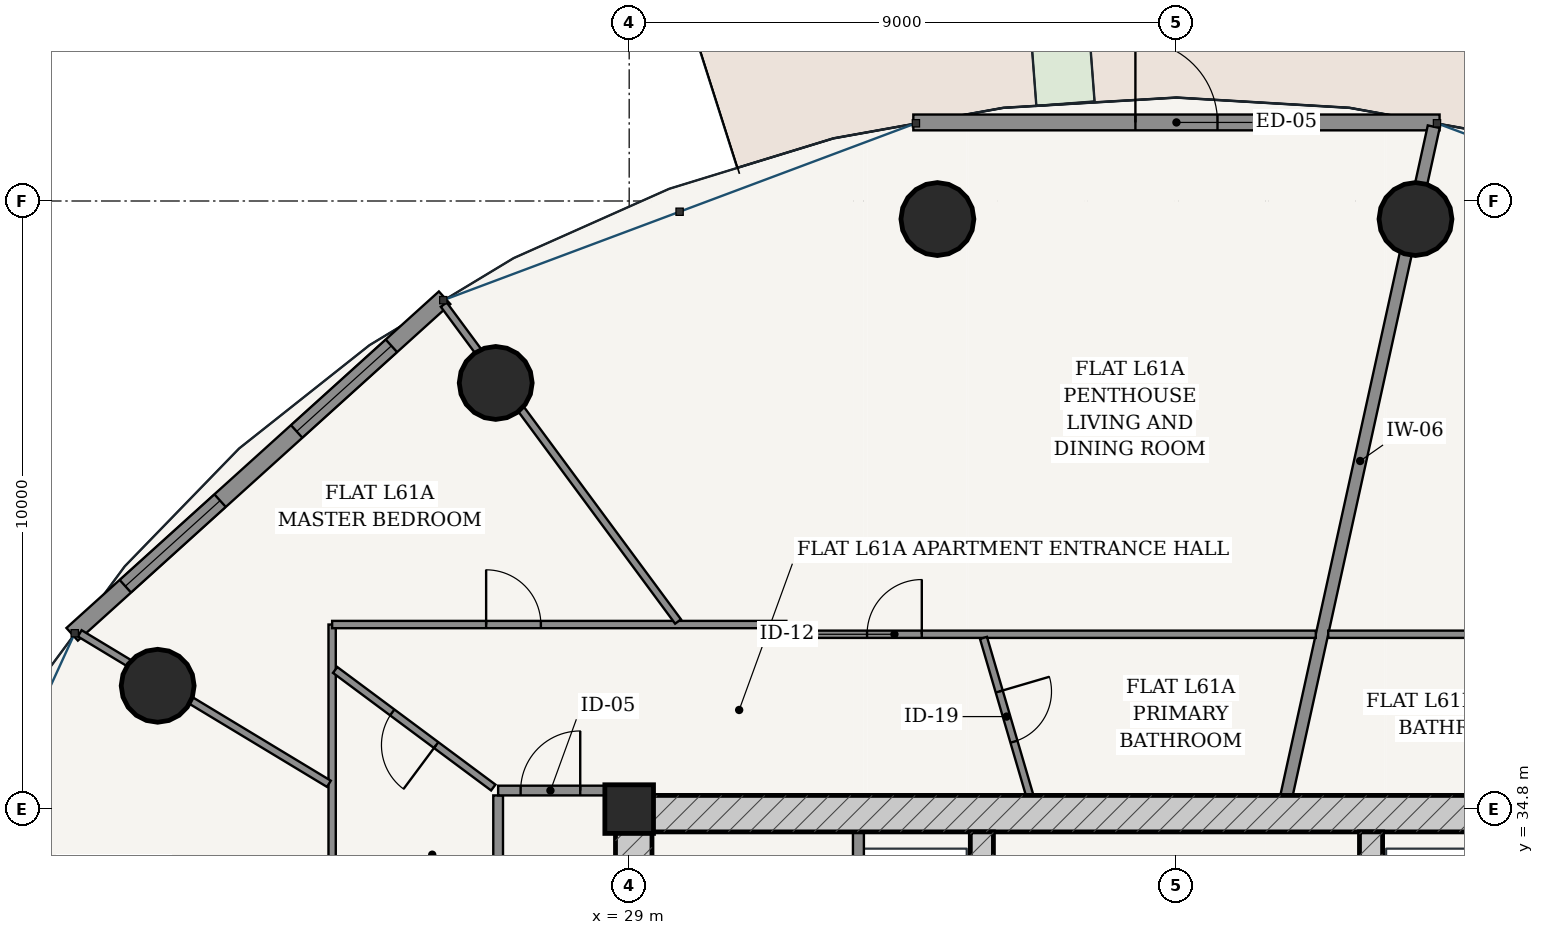
"""IFC4 building model, lengths in metres.
Left out: names, types, materials, properties, quantities, classifications, styles, units other than length and angle.
Written with IfcOpenShell. Run it as: python <this file> out.ifc"""

import sys

from ifc_helpers import new_model, si_unit, direction, frame, frame_2d, origin, origin_2d, place, context, subcontext, project, spatial, rectangle, hollow_circle, extrude, source, transform, mapped, element, fill, save


model = new_model("IFC4")
c1 = context("Model", 3, precision=1e-05, world=origin(), true_north=direction((-0.2419218956, 0.970295726276)))
c2 = subcontext(c1, "Body", "Model", "MODEL_VIEW")
j1 = project(units=[si_unit("LENGTHUNIT", "METRE"), si_unit("PLANEANGLEUNIT", "RADIAN")], contexts=[c1])
p1 = place(None, origin())
s1 = spatial("IfcSite", under=j1, at=p1, CompositionType="ELEMENT")
p2 = place(p1, origin())
s2 = spatial("IfcBuilding", under=s1, at=p2, CompositionType="ELEMENT")
p3 = place(p2, frame((0.0, 0.0, 231.9)))
s3 = spatial("IfcBuildingStorey", under=s2, at=p3, CompositionType="ELEMENT", Elevation=231.9)
p4 = place(p3, frame((29.0, 34.8, 0.0), z_axis=(0.0, 0.0, 1.0), x_axis=(1.0, 0.0, 0.0)))
e1 = element("IfcColumn", 1, at=p4, inside=s3, PredefinedType="COLUMN", context=c2, shape_type="SweptSolid", body=[
    extrude(rectangle(XDim=0.8, YDim=0.8, at=origin_2d()), origin(), (0.0, 0.0, 1.0), 3.7),
])
p5 = place(p3, frame((28.775, 34.725, 0.0), z_axis=(0.0, 0.0, 1.0), x_axis=(1.0, 0.0, 0.0)))
e2 = element("IfcWall", 2, at=p5, inside=s3, PredefinedType="SHEAR", context=c2, shape_type="SweptSolid", body=[
    extrude(rectangle(XDim=18.45, YDim=0.6, at=frame_2d((9.225, 0.0))), origin(), (0.0, 0.0, 1.0), 3.435),
])
p6 = place(p3, frame((29.075, 19.175, 0.0), z_axis=(0.0, 0.0, 1.0), x_axis=(0.0, 1.0, 0.0)))
e3 = element("IfcWall", 3, at=p6, inside=s3, PredefinedType="SHEAR", context=c2, shape_type="SweptSolid", body=[
    extrude(rectangle(XDim=15.25, YDim=0.6, at=frame_2d((7.625, 0.0))), origin(), (0.0, 0.0, 1.0), 3.435),
])
p7 = place(p6, frame((9.875, 0.0, 0.0)))
e4 = element("IfcOpeningElement", 4, at=p7, cuts=e3, PredefinedType="OPENING", context=c2, shape_type="SweptSolid", body=[
    extrude(rectangle(XDim=1.5, YDim=2.2, at=frame_2d((0.75, 1.1))), frame((0.0, 0.31, 0.0), z_axis=(0.0, -1.0, 0.0), x_axis=(1.0, 0.0, 0.0)), (0.0, 0.0, 1.0), 0.62),
])
p8 = place(p3, frame((34.8, 19.175, 0.0), z_axis=(0.0, 0.0, 1.0), x_axis=(0.0, 1.0, 0.0)))
e5 = element("IfcWall", 5, at=p8, inside=s3, PredefinedType="SHEAR", context=c2, shape_type="SweptSolid", body=[
    extrude(rectangle(XDim=15.25, YDim=0.38, at=frame_2d((7.625, 0.0))), origin(), (0.0, 0.0, 1.0), 3.435),
])
p9 = place(p8, frame((7.8, 0.0, 0.0)))
e6 = element("IfcOpeningElement", 6, at=p9, cuts=e5, PredefinedType="OPENING", context=c2, shape_type="SweptSolid", body=[
    extrude(rectangle(XDim=1.05, YDim=2.15, at=frame_2d((0.525, 1.075))), frame((0.0, 0.2, 0.0), z_axis=(0.0, -1.0, 0.0), x_axis=(1.0, 0.0, 0.0)), (0.0, 0.0, 1.0), 0.4),
])
p10 = place(p3, frame((41.2, 19.175, 0.0), z_axis=(0.0, 0.0, 1.0), x_axis=(0.0, 1.0, 0.0)))
e7 = element("IfcWall", 7, at=p10, inside=s3, PredefinedType="SHEAR", context=c2, shape_type="SweptSolid", body=[
    extrude(rectangle(XDim=15.25, YDim=0.38, at=frame_2d((7.625, 0.0))), origin(), (0.0, 0.0, 1.0), 3.435),
])
p11 = place(p10, frame((7.8, 0.0, 0.0)))
e8 = element("IfcOpeningElement", 8, at=p11, cuts=e7, PredefinedType="OPENING", context=c2, shape_type="SweptSolid", body=[
    extrude(rectangle(XDim=1.05, YDim=2.15, at=frame_2d((0.525, 1.075))), frame((0.0, 0.2, 0.0), z_axis=(0.0, -1.0, 0.0), x_axis=(1.0, 0.0, 0.0)), (0.0, 0.0, 1.0), 0.4),
])
for number, where, z_axis, x_axis in (
    (9, (41.931, 44.503, 0.0), (0.0, 0.0, 1.0), (1.0, 0.0, 0.0)),
    (10, (34.069, 44.503, 0.0), (0.0, 0.0, 1.0), (1.0, 0.0, 0.0)),
    (11, (26.805, 41.808, 0.0), (0.0, 0.0, 1.0), (1.0, 0.0, 0.0)),
    (12, (21.246, 36.828, 0.0), (0.0, 0.0, 1.0), (1.0, 0.0, 0.0)),
):
    element("IfcColumn", number, at=place(p3, frame(where, z_axis=z_axis, x_axis=x_axis)), inside=s3, PredefinedType="COLUMN", context=c2, shape_type="SweptSolid", body=[
        extrude(hollow_circle(Radius=0.6, WallThickness=0.038, at=origin_2d()), origin(), (0.0, 0.0, 1.0), 3.7),
    ])
p12 = place(p3, frame((42.327, 46.092, 0.0), z_axis=(0.0, 0.0, 1.0), x_axis=(-1.0, 0.0, 0.0)))
e13 = element("IfcWall", 13, at=p12, inside=s3, PredefinedType="SOLIDWALL", context=c2, shape_type="SweptSolid", body=[
    extrude(rectangle(XDim=8.654, YDim=0.26, at=frame_2d((4.327, 0.0))), origin(), (0.0, 0.0, 1.0), 3.435),
])
p13 = place(p12, frame((3.652, 0.0, 0.0)))
e14 = element("IfcOpeningElement", 14, at=p13, cuts=e13, PredefinedType="OPENING", context=c2, shape_type="SweptSolid", body=[
    extrude(rectangle(XDim=1.35, YDim=2.2, at=frame_2d((0.675, 1.1))), frame((0.0, 0.14, 0.0), z_axis=(0.0, -1.0, 0.0), x_axis=(1.0, 0.0, 0.0)), (0.0, 0.0, 1.0), 0.28),
])
p14 = place(p3, frame((25.965, 43.209, 0.0), z_axis=(0.0, 0.0, 1.0), x_axis=(-0.741972126783, -0.670430729514, 0.0)))
e15 = element("IfcWall", 15, at=p14, inside=s3, PredefinedType="SOLIDWALL", context=c2, shape_type="SweptSolid", body=[
    extrude(rectangle(XDim=8.255, YDim=0.28, at=frame_2d((4.127, 0.0))), origin(), (0.0, 0.0, 1.0), 3.435),
])
p15 = place(p14, frame((1.179, 0.0, 0.85)))
e16 = element("IfcOpeningElement", 16, at=p15, cuts=e15, PredefinedType="OPENING", context=c2, shape_type="SweptSolid", body=[
    extrude(rectangle(XDim=2.1, YDim=1.95, at=frame_2d((1.05, 0.975))), frame((0.0, 0.15, 0.0), z_axis=(0.0, -1.0, 0.0), x_axis=(1.0, 0.0, 0.0)), (0.0, 0.0, 1.0), 0.3),
])
p16 = place(p14, frame((4.976, 0.0, 0.85)))
e17 = element("IfcOpeningElement", 17, at=p16, cuts=e15, PredefinedType="OPENING", context=c2, shape_type="SweptSolid", body=[
    extrude(rectangle(XDim=2.1, YDim=1.95, at=frame_2d((1.05, 0.975))), frame((0.0, 0.15, 0.0), z_axis=(0.0, -1.0, 0.0), x_axis=(1.0, 0.0, 0.0)), (0.0, 0.0, 1.0), 0.3),
])
p17 = place(p3, frame((32.77, 28.52, 0.0), z_axis=(0.0, 0.0, 1.0), x_axis=(0.0, 1.0, 0.0)))
e18 = element("IfcWall", 18, at=p17, inside=s3, PredefinedType="PARTITIONING", context=c2, shape_type="SweptSolid", body=[
    extrude(rectangle(XDim=5.905, YDim=0.18, at=frame_2d((2.953, 0.0))), origin(), (0.0, 0.0, 1.0), 3.435),
])
p18 = place(p17, frame((3.655, 0.0, 0.0)))
e19 = element("IfcOpeningElement", 19, at=p18, cuts=e18, PredefinedType="OPENING", context=c2, shape_type="SweptSolid", body=[
    extrude(rectangle(XDim=1.15, YDim=2.2, at=frame_2d((0.575, 1.1))), frame((0.0, 0.1, 0.0), z_axis=(0.0, -1.0, 0.0), x_axis=(1.0, 0.0, 0.0)), (0.0, 0.0, 1.0), 0.2),
])
p19 = place(p17, frame((0.73, 0.0, 0.0)))
e20 = element("IfcOpeningElement", 20, at=p19, cuts=e18, PredefinedType="OPENING", context=c2, shape_type="SweptSolid", body=[
    extrude(rectangle(XDim=1.2, YDim=2.25, at=frame_2d((0.6, 1.125))), frame((0.0, 0.1, 0.0), z_axis=(0.0, -1.0, 0.0), x_axis=(1.0, 0.0, 0.0)), (0.0, 0.0, 1.0), 0.2),
])
p20 = place(p3, frame((26.845, 24.4, 0.0), z_axis=(0.0, 0.0, 1.0), x_axis=(0.0, 1.0, 0.0)))
e21 = element("IfcWall", 21, at=p20, inside=s3, PredefinedType="PARTITIONING", context=c2, shape_type="SweptSolid", body=[
    extrude(rectangle(XDim=10.625, YDim=0.16, at=frame_2d((5.312, 0.0))), origin(), (0.0, 0.0, 1.0), 2.951),
])
p21 = place(p3, frame((26.845, 35.105, 0.0), z_axis=(0.0, 0.0, 1.0), x_axis=(1.0, 0.0, 0.0)))
e22 = element("IfcWall", 22, at=p21, inside=s3, PredefinedType="PARTITIONING", context=c2, shape_type="SweptSolid", body=[
    extrude(rectangle(XDim=1.93, YDim=0.16, at=frame_2d((0.965, 0.0))), origin(), (0.0, 0.0, 1.0), 3.435),
])
p22 = place(p21, frame((0.37, 0.0, 0.0)))
e23 = element("IfcOpeningElement", 23, at=p22, cuts=e22, PredefinedType="OPENING", context=c2, shape_type="SweptSolid", body=[
    extrude(rectangle(XDim=0.98, YDim=2.2, at=frame_2d((0.49, 1.1))), frame((0.0, 0.09, 0.0), z_axis=(0.0, -1.0, 0.0), x_axis=(1.0, 0.0, 0.0)), (0.0, 0.0, 1.0), 0.18),
])
p23 = place(p3, frame((39.811, 35.027, 0.0), z_axis=(0.0, 0.0, 1.0), x_axis=(0.214966857327, 0.976621344356, 0.0)))
e24 = element("IfcWall", 24, at=p23, inside=s3, PredefinedType="PARTITIONING", context=c2, shape_type="SweptSolid", body=[
    extrude(rectangle(XDim=11.258, YDim=0.2, at=frame_2d((5.629, 0.0))), origin(), (0.0, 0.0, 1.0), 2.52),
])
p24 = place(p3, frame((24.115, 21.59, 0.0), z_axis=(0.0, 0.0, 1.0), x_axis=(0.0, 1.0, 0.0)))
e25 = element("IfcWall", 25, at=p24, inside=s3, PredefinedType="PARTITIONING", context=c2, shape_type="SweptSolid", body=[
    extrude(rectangle(XDim=16.245, YDim=0.12, at=frame_2d((8.123, 0.0))), origin(), (0.0, 0.0, 1.0), 2.951),
])
p25 = place(p24, frame((10.733, 0.0, 0.0)))
e26 = element("IfcOpeningElement", 26, at=p25, cuts=e25, PredefinedType="OPENING", context=c2, shape_type="SweptSolid", body=[
    extrude(rectangle(XDim=0.9, YDim=2.15, at=frame_2d((0.45, 1.075))), frame((0.0, 0.07, 0.0), z_axis=(0.0, -1.0, 0.0), x_axis=(1.0, 0.0, 0.0)), (0.0, 0.0, 1.0), 0.14),
])
p26 = place(p3, frame((24.115, 37.835, 0.0), z_axis=(0.0, 0.0, 1.0), x_axis=(1.0, 0.0, 0.0)))
e27 = element("IfcWall", 27, at=p26, inside=s3, PredefinedType="PARTITIONING", context=c2, shape_type="SweptSolid", body=[
    extrude(rectangle(XDim=7.47, YDim=0.12, at=frame_2d((3.735, 0.0))), origin(), (0.0, 0.0, 1.0), 2.951),
])
p27 = place(p26, frame((2.533, 0.0, 0.0)))
e28 = element("IfcOpeningElement", 28, at=p27, cuts=e27, PredefinedType="OPENING", context=c2, shape_type="SweptSolid", body=[
    extrude(rectangle(XDim=0.9, YDim=2.15, at=frame_2d((0.45, 1.075))), frame((0.0, 0.07, 0.0), z_axis=(0.0, -1.0, 0.0), x_axis=(1.0, 0.0, 0.0)), (0.0, 0.0, 1.0), 0.14),
])
p28 = place(p3, frame((31.585, 37.675, 0.0), z_axis=(0.0, 0.0, 1.0), x_axis=(1.0, 0.0, 0.0)))
e29 = element("IfcWall", 29, at=p28, inside=s3, PredefinedType="PARTITIONING", context=c2, shape_type="SweptSolid", body=[
    extrude(rectangle(XDim=8.707, YDim=0.12, at=frame_2d((4.354, 0.0))), origin(), (0.0, 0.0, 1.0), 2.951),
])
p29 = place(p28, frame((1.327, 0.0, 0.0)))
e30 = element("IfcOpeningElement", 30, at=p29, cuts=e29, PredefinedType="OPENING", context=c2, shape_type="SweptSolid", body=[
    extrude(rectangle(XDim=0.9, YDim=2.15, at=frame_2d((0.45, 1.075))), frame((0.0, 0.07, 0.0), z_axis=(0.0, -1.0, 0.0), x_axis=(1.0, 0.0, 0.0)), (0.0, 0.0, 1.0), 0.14),
])
p30 = place(p3, frame((29.804, 37.885, 0.0), z_axis=(0.0, 0.0, 1.0), x_axis=(-0.594507557292, 0.804090022524, 0.0)))
e31 = element("IfcWall", 31, at=p30, inside=s3, PredefinedType="PARTITIONING", context=c2, shape_type="SweptSolid", body=[
    extrude(rectangle(XDim=6.481, YDim=0.12, at=frame_2d((3.241, 0.0))), origin(), (0.0, 0.0, 1.0), 2.951),
])
p31 = place(p3, frame((24.062, 35.216, 0.0), z_axis=(0.0, 0.0, 1.0), x_axis=(-0.856058483833, 0.516878972543, 0.0)))
e32 = element("IfcWall", 32, at=p31, inside=s3, PredefinedType="PARTITIONING", context=c2, shape_type="SweptSolid", body=[
    extrude(rectangle(XDim=4.787, YDim=0.12, at=frame_2d((2.393, 0.0))), origin(), (0.0, 0.0, 1.0), 2.951),
])
p32 = place(p3, frame((35.586, 35.027, 0.0), z_axis=(0.0, 0.0, 1.0), x_axis=(-0.281539118681, 0.959549751004, 0.0)))
e33 = element("IfcWall", 33, at=p32, inside=s3, PredefinedType="PARTITIONING", context=c2, shape_type="SweptSolid", body=[
    extrude(rectangle(XDim=2.698, YDim=0.12, at=frame_2d((1.349, 0.0))), origin(), (0.0, 0.0, 1.0), 2.52),
])
p33 = place(p32, frame((0.919, 0.0, 0.0)))
e34 = element("IfcOpeningElement", 34, at=p33, cuts=e33, PredefinedType="OPENING", context=c2, shape_type="SweptSolid", body=[
    extrude(rectangle(XDim=0.86, YDim=2.15, at=frame_2d((0.43, 1.075))), frame((0.0, 0.07, 0.0), z_axis=(0.0, -1.0, 0.0), x_axis=(1.0, 0.0, 0.0)), (0.0, 0.0, 1.0), 0.14),
])
p34 = place(p3, frame((26.765, 35.154, 0.0), z_axis=(0.0, 0.0, 1.0), x_axis=(-0.802434587752, 0.596740087793, 0.0)))
e35 = element("IfcWall", 35, at=p34, inside=s3, PredefinedType="PARTITIONING", context=c2, shape_type="SweptSolid", body=[
    extrude(rectangle(XDim=3.24, YDim=0.12, at=frame_2d((1.62, 0.0))), origin(), (0.0, 0.0, 1.0), 3.11),
])
p35 = place(p34, frame((1.17, 0.0, 0.0)))
e36 = element("IfcOpeningElement", 36, at=p35, cuts=e35, PredefinedType="OPENING", context=c2, shape_type="SweptSolid", body=[
    extrude(rectangle(XDim=0.9, YDim=2.15, at=frame_2d((0.45, 1.075))), frame((0.0, 0.07, 0.0), z_axis=(0.0, -1.0, 0.0), x_axis=(1.0, 0.0, 0.0)), (0.0, 0.0, 1.0), 0.14),
])
p36 = place(p3, frame((40.496, 37.675, 0.0), z_axis=(0.0, 0.0, 1.0), x_axis=(1.0, 0.0, 0.0)))
e37 = element("IfcWall", 37, at=p36, inside=s3, PredefinedType="PARTITIONING", context=c2, shape_type="SweptSolid", body=[
    extrude(rectangle(XDim=3.919, YDim=0.12, at=frame_2d((1.959, 0.0))), origin(), (0.0, 0.0, 1.0), 2.951),
])
m1 = source(origin(), c2, "Body", "SweptSolid", [
    extrude(rectangle(XDim=1.35, YDim=2.2, at=frame_2d((0.675, 1.1))), frame((0.0, 0.025, 0.0), z_axis=(0.0, -1.0, 0.0), x_axis=(1.0, 0.0, 0.0)), (0.0, 0.0, 1.0), 0.05),
])
p37 = place(p13, frame((1.35, 0.0, 0.0), z_axis=(0.0, 0.0, 1.0), x_axis=(-1.0, 0.0, 0.0)))
e38 = element("IfcDoor", 38, at=p37, inside=s3, OperationType="SINGLE_SWING_LEFT", PredefinedType="DOOR", context=c2, shape_type="MappedRepresentation", body=[
    mapped(m1, transform((0.0, 0.0, 0.0), scale=1.0)),
])
fill(e14, e38)
m2 = source(origin(), c2, "Body", "SweptSolid", [
    extrude(rectangle(XDim=2.1, YDim=1.95, at=frame_2d((1.05, 0.975))), frame((0.0, 0.03, 0.0), z_axis=(0.0, -1.0, 0.0), x_axis=(1.0, 0.0, 0.0)), (0.0, 0.0, 1.0), 0.06),
])
p38 = place(p15, origin())
e39 = element("IfcWindow", 39, at=p38, inside=s3, PartitioningType="SINGLE_PANEL", PredefinedType="WINDOW", context=c2, shape_type="MappedRepresentation", body=[
    mapped(m2, transform((0.0, 0.0, 0.0), scale=1.0)),
])
fill(e16, e39)
p39 = place(p16, origin())
e40 = element("IfcWindow", 40, at=p39, inside=s3, PartitioningType="SINGLE_PANEL", PredefinedType="WINDOW", context=c2, shape_type="MappedRepresentation", body=[
    mapped(m2, transform((0.0, 0.0, 0.0), scale=1.0)),
])
fill(e17, e40)
m3 = source(origin(), c2, "Body", "SweptSolid", [
    extrude(rectangle(XDim=0.98, YDim=2.2, at=frame_2d((0.49, 1.1))), frame((0.0, 0.025, 0.0), z_axis=(0.0, -1.0, 0.0), x_axis=(1.0, 0.0, 0.0)), (0.0, 0.0, 1.0), 0.05),
])
p40 = place(p22, origin())
e41 = element("IfcDoor", 41, at=p40, inside=s3, OperationType="SINGLE_SWING_RIGHT", PredefinedType="DOOR", context=c2, shape_type="MappedRepresentation", body=[
    mapped(m3, transform((0.0, 0.0, 0.0), scale=1.0)),
])
fill(e23, e41)
m4 = source(origin(), c2, "Body", "SweptSolid", [
    extrude(rectangle(XDim=0.86, YDim=2.15, at=frame_2d((0.43, 1.075))), frame((0.0, 0.025, 0.0), z_axis=(0.0, -1.0, 0.0), x_axis=(1.0, 0.0, 0.0)), (0.0, 0.0, 1.0), 0.05),
])
p41 = place(p33, frame((0.86, 0.0, 0.0), z_axis=(0.0, 0.0, 1.0), x_axis=(-1.0, 0.0, 0.0)))
e42 = element("IfcDoor", 42, at=p41, inside=s3, OperationType="SINGLE_SWING_LEFT", PredefinedType="DOOR", context=c2, shape_type="MappedRepresentation", body=[
    mapped(m4, transform((0.0, 0.0, 0.0), scale=1.0)),
])
fill(e34, e42)
m5 = source(origin(), c2, "Body", "SweptSolid", [
    extrude(rectangle(XDim=0.9, YDim=2.15, at=frame_2d((0.45, 1.075))), frame((0.0, 0.025, 0.0), z_axis=(0.0, -1.0, 0.0), x_axis=(1.0, 0.0, 0.0)), (0.0, 0.0, 1.0), 0.05),
])
p42 = place(p29, origin())
e43 = element("IfcDoor", 43, at=p42, inside=s3, OperationType="SINGLE_SWING_RIGHT", PredefinedType="DOOR", context=c2, shape_type="MappedRepresentation", body=[
    mapped(m5, transform((0.0, 0.0, 0.0), scale=1.0)),
])
fill(e30, e43)
p43 = place(p35, origin())
e44 = element("IfcDoor", 44, at=p43, inside=s3, OperationType="SINGLE_SWING_LEFT", PredefinedType="DOOR", context=c2, shape_type="MappedRepresentation", body=[
    mapped(m5, transform((0.0, 0.0, 0.0), scale=1.0)),
])
fill(e36, e44)
p44 = place(p27, origin())
e45 = element("IfcDoor", 45, at=p44, inside=s3, OperationType="SINGLE_SWING_LEFT", PredefinedType="DOOR", context=c2, shape_type="MappedRepresentation", body=[
    mapped(m5, transform((0.0, 0.0, 0.0), scale=1.0)),
])
fill(e28, e45)
save(model, sys.argv[1])
